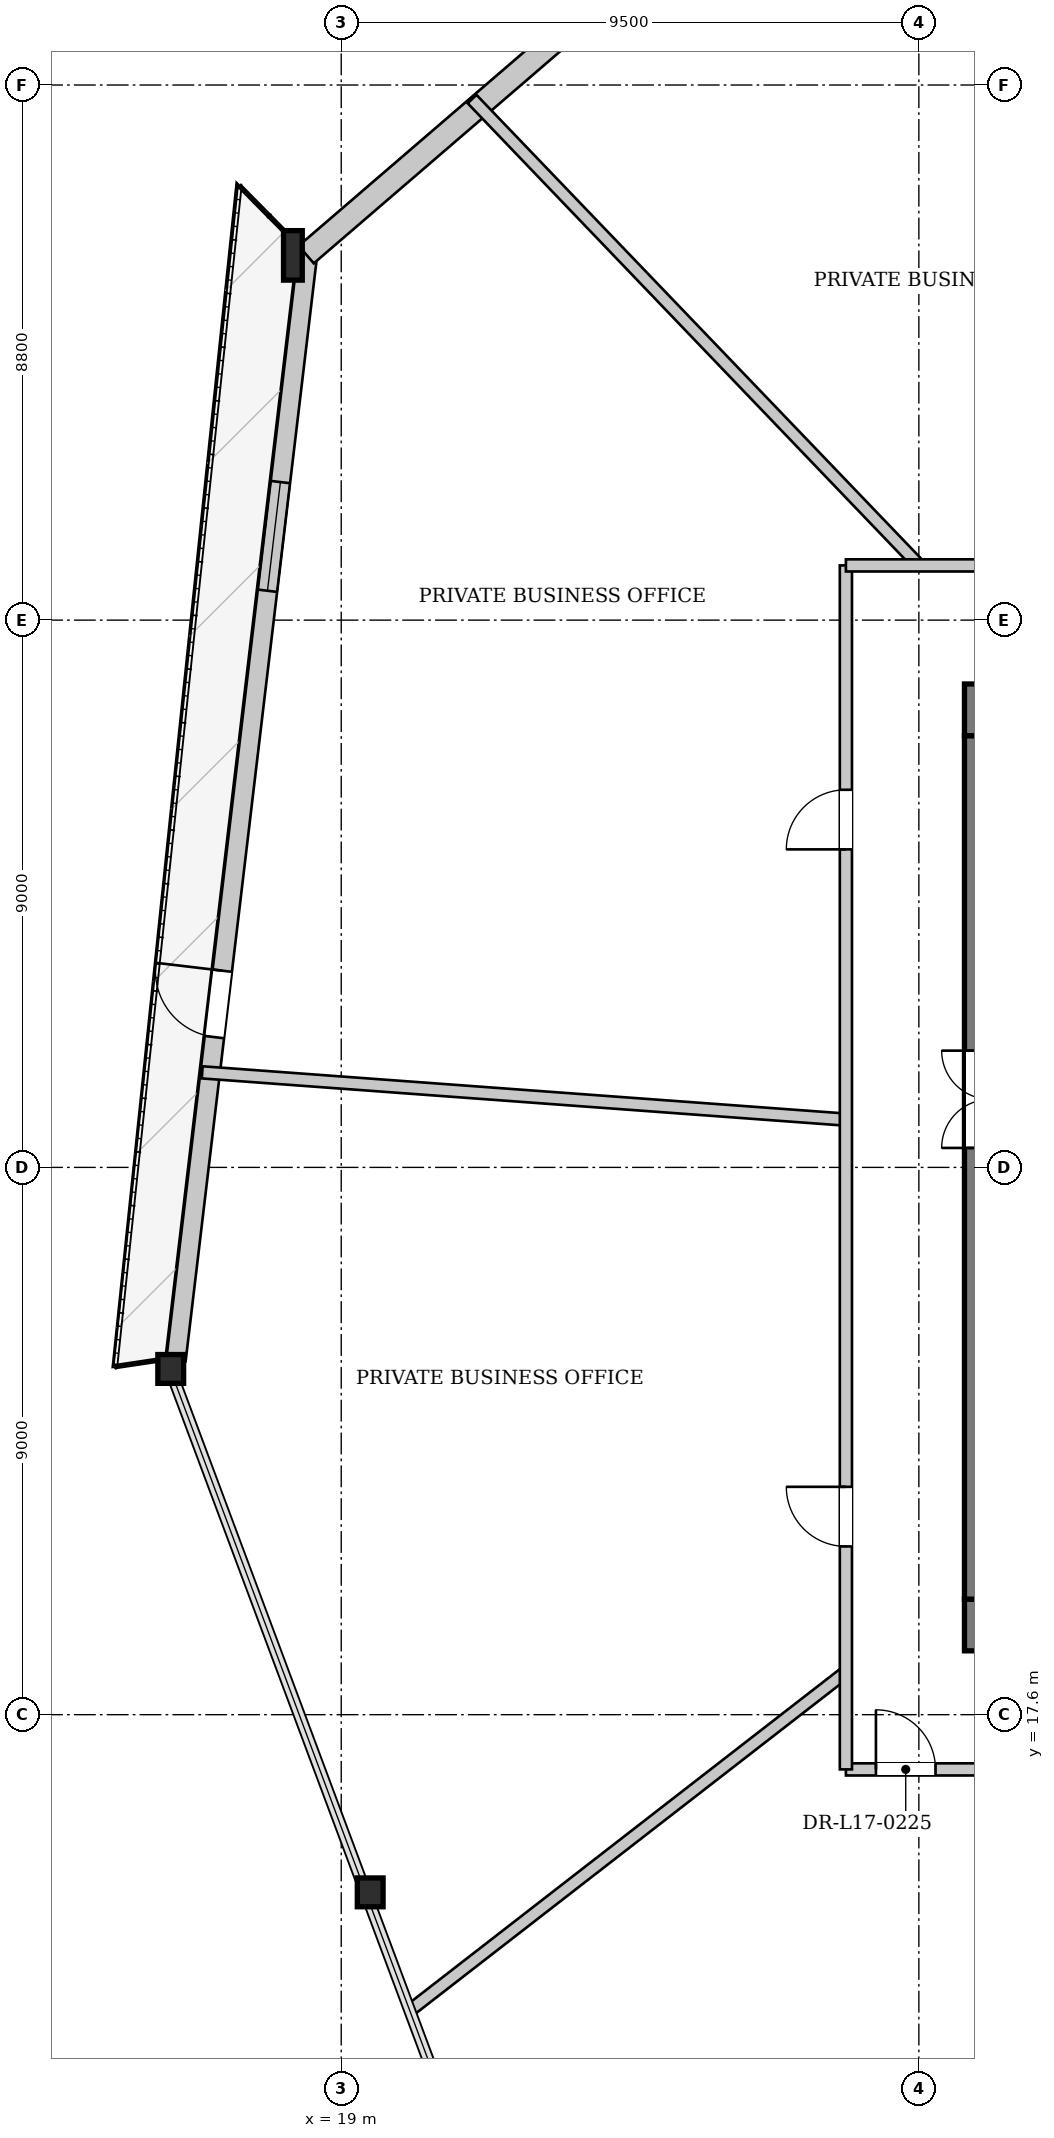
"""IFC4 building model, lengths in metres.
Left out: names, types, materials, properties, quantities, classifications, styles, units other than length and angle.
Written with IfcOpenShell. Run it as: python <this file> out.ifc"""

import sys

from ifc_helpers import new_model, si_unit, direction, frame, frame_2d, origin, origin_2d, place, context, subcontext, project, spatial, rectangle, i_section, extrude, source, transform, mapped, element, fill, save


model = new_model("IFC4")
c1 = context("Model", 3, precision=1e-05, world=origin(), true_north=direction((0.0, 1.0)))
c2 = subcontext(c1, "Body", "Model", "MODEL_VIEW")
j1 = project(units=[si_unit("LENGTHUNIT", "METRE"), si_unit("PLANEANGLEUNIT", "RADIAN")], contexts=[c1])
p1 = place(None, origin())
s1 = spatial("IfcSite", under=j1, at=p1, CompositionType="ELEMENT")
p2 = place(p1, origin())
s2 = spatial("IfcBuilding", under=s1, at=p2, CompositionType="ELEMENT")
p3 = place(p2, frame((0.0, 0.0, 68.35)))
s3 = spatial("IfcBuildingStorey", under=s2, at=p3, CompositionType="ELEMENT", Elevation=68.35)
m1 = source(origin(), c2, "Body", "SweptSolid", [
    extrude(i_section(OverallWidth=0.308, OverallDepth=0.814, WebThickness=0.021, FlangeThickness=0.04, at=origin_2d()), origin(), (0.0, 0.0, 1.0), 3.405),
])
p4 = place(p3, frame((18.301, 41.756, 0.0), z_axis=(-0.056070863616, -0.092352010661, 0.994146450167), x_axis=(0.854787515222, -0.518978134242, 0.0)))
e1 = element("IfcColumn", 1, at=p4, inside=s3, PredefinedType="COLUMN", context=c2, shape_type="MappedRepresentation", body=[
    mapped(m1, transform((0.0, 0.0, 0.0), x_axis=(1.0, 0.0, 0.0), y_axis=(0.0, 1.0, 0.0), z_axis=(0.0, 0.0, 1.0), scale=1.0)),
])
m2 = source(origin(), c2, "Body", "SweptSolid", [
    extrude(i_section(OverallWidth=0.424, OverallDepth=0.474, WebThickness=0.043, FlangeThickness=0.068, at=origin_2d()), origin(), (0.0, 0.0, 1.0), 3.404),
])
p5 = place(p3, frame((16.123, 23.45, 0.0), z_axis=(0.042745101323, -0.096678517757, 0.994397365502), x_axis=(0.914593250106, 0.404375057169, 0.0)))
e2 = element("IfcColumn", 2, at=p5, inside=s3, PredefinedType="COLUMN", context=c2, shape_type="MappedRepresentation", body=[
    mapped(m2, transform((0.0, 0.0, 0.0), x_axis=(1.0, 0.0, 0.0), y_axis=(0.0, 1.0, 0.0), z_axis=(0.0, 0.0, 1.0), scale=1.0)),
])
m3 = source(origin(), c2, "Body", "SweptSolid", [
    extrude(i_section(OverallWidth=0.424, OverallDepth=0.474, WebThickness=0.043, FlangeThickness=0.068, at=origin_2d()), origin(), (0.0, 0.0, 1.0), 3.406),
])
p6 = place(p3, frame((19.349, 14.816, 0.0), z_axis=(0.074838217238, -0.081003051225, 0.993900270114), x_axis=(0.734504329916, 0.678604000382, 0.0)))
e3 = element("IfcColumn", 3, at=p6, inside=s3, PredefinedType="COLUMN", context=c2, shape_type="MappedRepresentation", body=[
    mapped(m3, transform((0.0, 0.0, 0.0), x_axis=(1.0, 0.0, 0.0), y_axis=(0.0, 1.0, 0.0), z_axis=(0.0, 0.0, 1.0), scale=1.0)),
])
p7 = place(p3, frame((50.417, 12.765, 0.0), z_axis=(0.0, 0.0, 1.0), x_axis=(-0.929420161731, -0.369023255322, 0.0)))
e4 = element("IfcWall", 4, at=p7, inside=s3, PredefinedType="SOLIDWALL", context=c2, shape_type="SweptSolid", body=[
    extrude(rectangle(XDim=24.318, YDim=0.32, at=frame_2d((12.159, 0.0))), origin(), (0.0, 0.0, 1.0), 2.592),
])
p8 = place(p7, frame((7.232, 0.0, 0.0)))
e5 = element("IfcOpeningElement", 5, at=p8, cuts=e4, PredefinedType="OPENING", context=c2, shape_type="SweptSolid", body=[
    extrude(rectangle(XDim=1.1, YDim=2.3, at=frame_2d((0.55, 1.15))), frame((0.0, 0.17, 0.0), z_axis=(0.0, -1.0, 0.0), x_axis=(1.0, 0.0, 0.0)), (0.0, 0.0, 1.0), 0.34),
])
p9 = place(p7, frame((18.195, 0.0, 0.272)))
e6 = element("IfcOpeningElement", 6, at=p9, cuts=e4, PredefinedType="OPENING", context=c2, shape_type="SweptSolid", body=[
    extrude(rectangle(XDim=1.8, YDim=2.2, at=frame_2d((0.9, 1.1))), frame((0.0, 0.17, 0.0), z_axis=(0.0, -1.0, 0.0), x_axis=(1.0, 0.0, 0.0)), (0.0, 0.0, 1.0), 0.34),
])
p10 = place(p3, frame((16.282, 23.431, 0.0), z_axis=(0.0, 0.0, 1.0), x_axis=(0.118122099546, 0.992999078347, 0.0)))
e7 = element("IfcWall", 7, at=p10, inside=s3, PredefinedType="SOLIDWALL", context=c2, shape_type="SweptSolid", body=[
    extrude(rectangle(XDim=18.434, YDim=0.32, at=frame_2d((9.217, 0.0))), origin(), (0.0, 0.0, 1.0), 2.592),
])
p11 = place(p10, frame((5.349, 0.0, 0.0)))
e8 = element("IfcOpeningElement", 8, at=p11, cuts=e7, PredefinedType="OPENING", context=c2, shape_type="SweptSolid", body=[
    extrude(rectangle(XDim=1.1, YDim=2.3, at=frame_2d((0.55, 1.15))), frame((0.0, 0.17, 0.0), z_axis=(0.0, -1.0, 0.0), x_axis=(1.0, 0.0, 0.0)), (0.0, 0.0, 1.0), 0.34),
])
p12 = place(p10, frame((12.741, 0.0, 0.272)))
e9 = element("IfcOpeningElement", 9, at=p12, cuts=e7, PredefinedType="OPENING", context=c2, shape_type="SweptSolid", body=[
    extrude(rectangle(XDim=1.8, YDim=2.2, at=frame_2d((0.9, 1.1))), frame((0.0, 0.17, 0.0), z_axis=(0.0, -1.0, 0.0), x_axis=(1.0, 0.0, 0.0)), (0.0, 0.0, 1.0), 0.34),
])
p13 = place(p3, frame((18.425, 41.612, 0.0), z_axis=(0.0, 0.0, 1.0), x_axis=(0.758105656075, 0.652131746066, 0.0)))
e10 = element("IfcWall", 10, at=p13, inside=s3, PredefinedType="SOLIDWALL", context=c2, shape_type="SweptSolid", body=[
    extrude(rectangle(XDim=6.1, YDim=0.38, at=frame_2d((3.05, 0.0))), origin(), (0.0, 0.0, 1.0), 2.592),
])
p14 = place(p3, frame((46.75, 19.075, 0.0), z_axis=(0.0, 0.0, 1.0), x_axis=(-1.0, 0.0, 0.0)))
e11 = element("IfcWall", 11, at=p14, inside=s3, PredefinedType="SHEAR", context=c2, shape_type="SweptSolid", body=[
    extrude(rectangle(XDim=17.5, YDim=0.85, at=frame_2d((8.75, 0.0))), origin(), (0.0, 0.0, 1.0), 3.3),
])
p15 = place(p14, frame((4.95, 0.0, 0.0)))
e12 = element("IfcOpeningElement", 12, at=p15, cuts=e11, PredefinedType="OPENING", context=c2, shape_type="SweptSolid", body=[
    extrude(rectangle(XDim=1.12, YDim=2.25, at=frame_2d((0.56, 1.125))), frame((0.0, 0.435, 0.0), z_axis=(0.0, -1.0, 0.0), x_axis=(1.0, 0.0, 0.0)), (0.0, 0.0, 1.0), 0.87),
])
p16 = place(p14, frame((11.45, 0.0, 0.0)))
e13 = element("IfcOpeningElement", 13, at=p16, cuts=e11, PredefinedType="OPENING", context=c2, shape_type="SweptSolid", body=[
    extrude(rectangle(XDim=1.12, YDim=2.25, at=frame_2d((0.56, 1.125))), frame((0.0, 0.435, 0.0), z_axis=(0.0, -1.0, 0.0), x_axis=(1.0, 0.0, 0.0)), (0.0, 0.0, 1.0), 0.87),
])
p17 = place(p3, frame((29.675, 19.5, 0.0), z_axis=(0.0, 0.0, 1.0), x_axis=(0.0, 1.0, 0.0)))
e14 = element("IfcWall", 14, at=p17, inside=s3, PredefinedType="SHEAR", context=c2, shape_type="SweptSolid", body=[
    extrude(rectangle(XDim=14.2, YDim=0.85, at=frame_2d((7.1, 0.0))), origin(), (0.0, 0.0, 1.0), 3.3),
])
p18 = place(p17, frame((7.42, 0.0, 0.0)))
e15 = element("IfcOpeningElement", 15, at=p18, cuts=e14, PredefinedType="OPENING", context=c2, shape_type="SweptSolid", body=[
    extrude(rectangle(XDim=1.6, YDim=2.2, at=frame_2d((0.8, 1.1))), frame((0.0, 0.435, 0.0), z_axis=(0.0, -1.0, 0.0), x_axis=(1.0, 0.0, 0.0)), (0.0, 0.0, 1.0), 0.87),
])
p19 = place(p3, frame((29.25, 34.125, 0.0), z_axis=(0.0, 0.0, 1.0), x_axis=(1.0, 0.0, 0.0)))
e16 = element("IfcWall", 16, at=p19, inside=s3, PredefinedType="SHEAR", context=c2, shape_type="SweptSolid", body=[
    extrude(rectangle(XDim=17.5, YDim=0.85, at=frame_2d((8.75, 0.0))), origin(), (0.0, 0.0, 1.0), 3.3),
])
p20 = place(p19, frame((1.85, 0.0, 0.0)))
e17 = element("IfcOpeningElement", 17, at=p20, cuts=e16, PredefinedType="OPENING", context=c2, shape_type="SweptSolid", body=[
    extrude(rectangle(XDim=0.95, YDim=2.1, at=frame_2d((0.475, 1.05))), frame((0.0, 0.435, 0.0), z_axis=(0.0, -1.0, 0.0), x_axis=(1.0, 0.0, 0.0)), (0.0, 0.0, 1.0), 0.87),
])
p21 = place(p19, frame((4.23, 0.0, 0.0)))
e18 = element("IfcOpeningElement", 18, at=p21, cuts=e16, PredefinedType="OPENING", context=c2, shape_type="SweptSolid", body=[
    extrude(rectangle(XDim=1.32, YDim=2.2, at=frame_2d((0.66, 1.1))), frame((0.0, 0.435, 0.0), z_axis=(0.0, -1.0, 0.0), x_axis=(1.0, 0.0, 0.0)), (0.0, 0.0, 1.0), 0.87),
])
p22 = place(p19, frame((15.3, 0.0, 0.0)))
e19 = element("IfcOpeningElement", 19, at=p22, cuts=e16, PredefinedType="OPENING", context=c2, shape_type="SweptSolid", body=[
    extrude(rectangle(XDim=0.95, YDim=2.1, at=frame_2d((0.475, 1.05))), frame((0.0, 0.435, 0.0), z_axis=(0.0, -1.0, 0.0), x_axis=(1.0, 0.0, 0.0)), (0.0, 0.0, 1.0), 0.87),
])
p23 = place(p3, frame((28.506, 36.5, 0.0), z_axis=(0.0, 0.0, 1.0), x_axis=(-0.692130904917, 0.721771993402, 0.0)))
e20 = element("IfcWall", 20, at=p23, inside=s3, PredefinedType="PARTITIONING", context=c2, shape_type="SweptSolid", body=[
    extrude(rectangle(XDim=10.625, YDim=0.2, at=frame_2d((5.312, 0.0))), origin(), (0.0, 0.0, 1.0), 3.3),
])
p24 = place(p3, frame((27.3, 27.386, 0.0), z_axis=(0.0, 0.0, 1.0), x_axis=(-0.997314744945, 0.073234551382, 0.0)))
e21 = element("IfcWall", 21, at=p24, inside=s3, PredefinedType="PARTITIONING", context=c2, shape_type="SweptSolid", body=[
    extrude(rectangle(XDim=10.615, YDim=0.2, at=frame_2d((5.307, 0.0))), origin(), (0.0, 0.0, 1.0), 3.3),
])
p25 = place(p3, frame((27.3, 18.3, 0.0), z_axis=(0.0, 0.0, 1.0), x_axis=(-0.790147791411, -0.612916362752, 0.0)))
e22 = element("IfcWall", 22, at=p25, inside=s3, PredefinedType="PARTITIONING", context=c2, shape_type="SweptSolid", body=[
    extrude(rectangle(XDim=9.048, YDim=0.2, at=frame_2d((4.524, 0.0))), origin(), (0.0, 0.0, 1.0), 3.3),
])
p26 = place(p3, frame((27.3, 16.7, 0.0), z_axis=(0.0, 0.0, 1.0), x_axis=(1.0, 0.0, 0.0)))
e23 = element("IfcWall", 23, at=p26, inside=s3, PredefinedType="PARTITIONING", context=c2, shape_type="SweptSolid", body=[
    extrude(rectangle(XDim=21.4, YDim=0.2, at=frame_2d((10.7, 0.0))), origin(), (0.0, 0.0, 1.0), 3.3),
])
p27 = place(p26, frame((0.494, 0.0, 0.0)))
e24 = element("IfcOpeningElement", 24, at=p27, cuts=e23, PredefinedType="OPENING", context=c2, shape_type="SweptSolid", body=[
    extrude(rectangle(XDim=0.98, YDim=2.15, at=frame_2d((0.49, 1.075))), frame((0.0, 0.11, 0.0), z_axis=(0.0, -1.0, 0.0), x_axis=(1.0, 0.0, 0.0)), (0.0, 0.0, 1.0), 0.22),
])
p28 = place(p26, frame((10.868, 0.0, 0.0)))
e25 = element("IfcOpeningElement", 25, at=p28, cuts=e23, PredefinedType="OPENING", context=c2, shape_type="SweptSolid", body=[
    extrude(rectangle(XDim=0.98, YDim=2.15, at=frame_2d((0.49, 1.075))), frame((0.0, 0.11, 0.0), z_axis=(0.0, -1.0, 0.0), x_axis=(1.0, 0.0, 0.0)), (0.0, 0.0, 1.0), 0.22),
])
p29 = place(p3, frame((27.3, 16.7, 0.0), z_axis=(0.0, 0.0, 1.0), x_axis=(0.0, 1.0, 0.0)))
e26 = element("IfcWall", 26, at=p29, inside=s3, PredefinedType="PARTITIONING", context=c2, shape_type="SweptSolid", body=[
    extrude(rectangle(XDim=19.8, YDim=0.2, at=frame_2d((9.9, 0.0))), origin(), (0.0, 0.0, 1.0), 3.3),
])
p30 = place(p29, frame((15.13, 0.0, 0.0)))
e27 = element("IfcOpeningElement", 27, at=p30, cuts=e26, PredefinedType="OPENING", context=c2, shape_type="SweptSolid", body=[
    extrude(rectangle(XDim=0.98, YDim=2.15, at=frame_2d((0.49, 1.075))), frame((0.0, 0.11, 0.0), z_axis=(0.0, -1.0, 0.0), x_axis=(1.0, 0.0, 0.0)), (0.0, 0.0, 1.0), 0.22),
])
p31 = place(p29, frame((3.667, 0.0, 0.0)))
e28 = element("IfcOpeningElement", 28, at=p31, cuts=e26, PredefinedType="OPENING", context=c2, shape_type="SweptSolid", body=[
    extrude(rectangle(XDim=0.98, YDim=2.15, at=frame_2d((0.49, 1.075))), frame((0.0, 0.11, 0.0), z_axis=(0.0, -1.0, 0.0), x_axis=(1.0, 0.0, 0.0)), (0.0, 0.0, 1.0), 0.22),
])
p32 = place(p3, frame((27.3, 36.5, 0.0), z_axis=(0.0, 0.0, 1.0), x_axis=(1.0, 0.0, 0.0)))
e29 = element("IfcWall", 29, at=p32, inside=s3, PredefinedType="PARTITIONING", context=c2, shape_type="SweptSolid", body=[
    extrude(rectangle(XDim=21.4, YDim=0.2, at=frame_2d((10.7, 0.0))), origin(), (0.0, 0.0, 1.0), 3.3),
])
p33 = place(p32, frame((3.439, 0.0, 0.0)))
e30 = element("IfcOpeningElement", 30, at=p33, cuts=e29, PredefinedType="OPENING", context=c2, shape_type="SweptSolid", body=[
    extrude(rectangle(XDim=0.98, YDim=2.15, at=frame_2d((0.49, 1.075))), frame((0.0, 0.11, 0.0), z_axis=(0.0, -1.0, 0.0), x_axis=(1.0, 0.0, 0.0)), (0.0, 0.0, 1.0), 0.22),
])
p34 = place(p32, frame((20.12, 0.0, 0.0)))
e31 = element("IfcOpeningElement", 31, at=p34, cuts=e29, PredefinedType="OPENING", context=c2, shape_type="SweptSolid", body=[
    extrude(rectangle(XDim=0.98, YDim=2.15, at=frame_2d((0.49, 1.075))), frame((0.0, 0.11, 0.0), z_axis=(0.0, -1.0, 0.0), x_axis=(1.0, 0.0, 0.0)), (0.0, 0.0, 1.0), 0.22),
])
p35 = place(p32, frame((13.104, 0.0, 0.0)))
e32 = element("IfcOpeningElement", 32, at=p35, cuts=e29, PredefinedType="OPENING", context=c2, shape_type="SweptSolid", body=[
    extrude(rectangle(XDim=0.98, YDim=2.15, at=frame_2d((0.49, 1.075))), frame((0.0, 0.11, 0.0), z_axis=(0.0, -1.0, 0.0), x_axis=(1.0, 0.0, 0.0)), (0.0, 0.0, 1.0), 0.22),
])
m4 = source(origin(), c2, "Body", "SweptSolid", [
    extrude(rectangle(XDim=1.1, YDim=2.3, at=frame_2d((0.55, 1.15))), frame((0.0, 0.025, 0.0), z_axis=(0.0, -1.0, 0.0), x_axis=(1.0, 0.0, 0.0)), (0.0, 0.0, 1.0), 0.05),
])
p36 = place(p11, origin())
e33 = element("IfcDoor", 33, at=p36, inside=s3, OperationType="SINGLE_SWING_RIGHT", PredefinedType="DOOR", context=c2, shape_type="MappedRepresentation", body=[
    mapped(m4, transform((0.0, 0.0, 0.0), x_axis=(1.0, 0.0, 0.0), y_axis=(0.0, 1.0, 0.0), z_axis=(0.0, 0.0, 1.0), scale=1.0)),
])
fill(e8, e33)
m5 = source(origin(), c2, "Body", "SweptSolid", [
    extrude(rectangle(XDim=1.8, YDim=2.2, at=frame_2d((0.9, 1.1))), frame((0.0, 0.03, 0.0), z_axis=(0.0, -1.0, 0.0), x_axis=(1.0, 0.0, 0.0)), (0.0, 0.0, 1.0), 0.06),
])
p37 = place(p12, origin())
e34 = element("IfcWindow", 34, at=p37, inside=s3, PartitioningType="SINGLE_PANEL", PredefinedType="WINDOW", context=c2, shape_type="MappedRepresentation", body=[
    mapped(m5, transform((0.0, 0.0, 0.0), x_axis=(1.0, 0.0, 0.0), y_axis=(0.0, 1.0, 0.0), z_axis=(0.0, 0.0, 1.0), scale=1.0)),
])
fill(e9, e34)
m6 = source(origin(), c2, "Body", "SweptSolid", [
    extrude(rectangle(XDim=0.98, YDim=2.15, at=frame_2d((0.49, 1.075))), frame((0.0, 0.025, 0.0), z_axis=(0.0, -1.0, 0.0), x_axis=(1.0, 0.0, 0.0)), (0.0, 0.0, 1.0), 0.05),
])
p38 = place(p27, origin())
e35 = element("IfcDoor", 35, at=p38, inside=s3, OperationType="SINGLE_SWING_LEFT", PredefinedType="DOOR", context=c2, shape_type="MappedRepresentation", body=[
    mapped(m6, transform((0.0, 0.0, 0.0), x_axis=(1.0, 0.0, 0.0), y_axis=(0.0, 1.0, 0.0), z_axis=(0.0, 0.0, 1.0), scale=1.0)),
])
fill(e24, e35)
p39 = place(p30, origin())
e36 = element("IfcDoor", 36, at=p39, inside=s3, OperationType="SINGLE_SWING_LEFT", PredefinedType="DOOR", context=c2, shape_type="MappedRepresentation", body=[
    mapped(m6, transform((0.0, 0.0, 0.0), x_axis=(1.0, 0.0, 0.0), y_axis=(0.0, 1.0, 0.0), z_axis=(0.0, 0.0, 1.0), scale=1.0)),
])
fill(e27, e36)
p40 = place(p31, origin())
e37 = element("IfcDoor", 37, at=p40, inside=s3, OperationType="SINGLE_SWING_RIGHT", PredefinedType="DOOR", context=c2, shape_type="MappedRepresentation", body=[
    mapped(m6, transform((0.0, 0.0, 0.0), x_axis=(1.0, 0.0, 0.0), y_axis=(0.0, 1.0, 0.0), z_axis=(0.0, 0.0, 1.0), scale=1.0)),
])
fill(e28, e37)
save(model, sys.argv[1])
